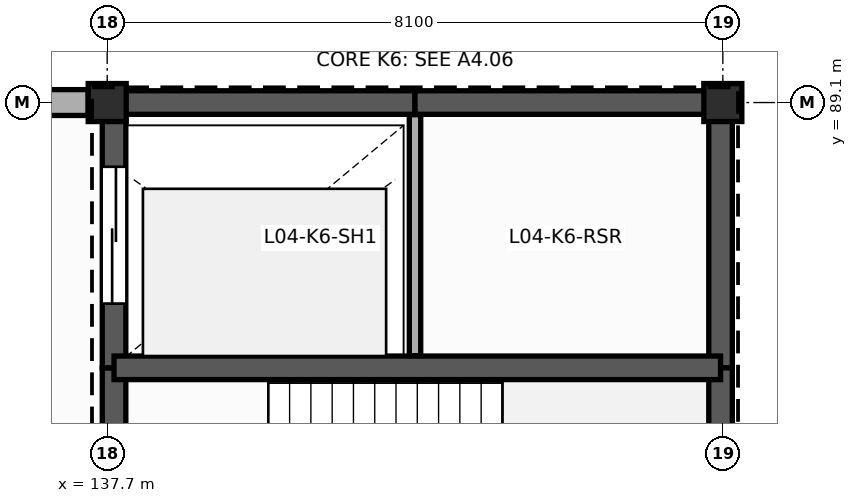
"""IFC4 building model, lengths in metres.
Left out: names, types, materials, properties, quantities, classifications, styles, units other than length and angle.
Written with IfcOpenShell. Run it as: python <this file> out.ifc"""

import sys

from ifc_helpers import new_model, si_unit, direction, frame, frame_2d, origin, origin_2d, place, context, subcontext, project, spatial, rectangle, extrude, element, fill, save


model = new_model("IFC4")
c1 = context("Model", 3, precision=1e-05, world=origin(), true_north=direction((0.0, 1.0)))
c2 = subcontext(c1, "Body", "Model", "MODEL_VIEW")
j1 = project(units=[si_unit("LENGTHUNIT", "METRE"), si_unit("PLANEANGLEUNIT", "RADIAN")], contexts=[c1])
p1 = place(None, origin())
s1 = spatial("IfcSite", under=j1, at=p1, CompositionType="ELEMENT")
p2 = place(p1, origin())
s2 = spatial("IfcBuilding", under=s1, at=p2, CompositionType="ELEMENT")
p3 = place(p2, frame((0.0, 0.0, 19.2)))
s3 = spatial("IfcBuildingStorey", under=s2, at=p3, CompositionType="ELEMENT", Elevation=19.2)
for number, where, z_axis, x_axis in (
    (1, (137.7, 89.1, 0.0), (0.0, 0.0, 1.0), (1.0, 0.0, 0.0)),
    (2, (145.8, 89.1, 0.0), (0.0, 0.0, 1.0), (1.0, 0.0, 0.0)),
):
    element("IfcColumn", number, at=place(p3, frame(where, z_axis=z_axis, x_axis=x_axis)), inside=s3, PredefinedType="COLUMN", context=c2, shape_type="SweptSolid", body=[
        extrude(rectangle(XDim=0.5, YDim=0.5, at=origin_2d()), origin(), (0.0, 0.0, 1.0), 4.2),
    ])
p4 = place(p3, frame((137.45, 89.1, 0.0), z_axis=(0.0, 0.0, 1.0), x_axis=(-1.0, 0.0, 0.0)))
e3 = element("IfcWall", 3, at=p4, inside=s3, PredefinedType="SOLIDWALL", context=c2, shape_type="SweptSolid", body=[
    extrude(rectangle(XDim=7.6, YDim=0.34, at=frame_2d((3.8, 0.0))), origin(), (0.0, 0.0, 1.0), 3.537),
])
p5 = place(p3, frame((137.79, 81.25, 0.0), z_axis=(0.0, 0.0, 1.0), x_axis=(0.0, 1.0, 0.0)))
e4 = element("IfcWall", 4, at=p5, inside=s3, PredefinedType="SHEAR", context=c2, shape_type="SweptSolid", body=[
    extrude(rectangle(XDim=4.36, YDim=0.31, at=frame_2d((2.18, 0.0))), origin(), (0.0, 0.0, 1.0), 4.2),
])
p6 = place(p5, frame((1.35, 0.0, 0.0)))
e5 = element("IfcOpeningElement", 5, at=p6, cuts=e4, PredefinedType="OPENING", context=c2, shape_type="SweptSolid", body=[
    extrude(rectangle(XDim=1.2, YDim=2.25, at=frame_2d((0.6, 1.125))), frame((0.0, 0.165, 0.0), z_axis=(0.0, -1.0, 0.0), x_axis=(1.0, 0.0, 0.0)), (0.0, 0.0, 1.0), 0.33),
])
p7 = place(p3, frame((137.79, 85.61, 0.0), z_axis=(0.0, 0.0, 1.0), x_axis=(0.0, 1.0, 0.0)))
e6 = element("IfcWall", 6, at=p7, inside=s3, PredefinedType="SHEAR", context=c2, shape_type="SweptSolid", body=[
    extrude(rectangle(XDim=3.49, YDim=0.31, at=frame_2d((1.745, 0.0))), origin(), (0.0, 0.0, 1.0), 4.2),
])
p8 = place(p7, frame((0.845, 0.0, 0.0)))
e7 = element("IfcOpeningElement", 7, at=p8, cuts=e6, PredefinedType="OPENING", context=c2, shape_type="SweptSolid", body=[
    extrude(rectangle(XDim=1.8, YDim=2.4, at=frame_2d((0.9, 1.2))), frame((0.0, 0.165, 0.0), z_axis=(0.0, -1.0, 0.0), x_axis=(1.0, 0.0, 0.0)), (0.0, 0.0, 1.0), 0.33),
])
p9 = place(p3, frame((137.79, 89.1, 0.0), z_axis=(0.0, 0.0, 1.0), x_axis=(1.0, 0.0, 0.0)))
e8 = element("IfcWall", 8, at=p9, inside=s3, PredefinedType="SHEAR", context=c2, shape_type="SweptSolid", body=[
    extrude(rectangle(XDim=3.96, YDim=0.31, at=frame_2d((1.98, 0.0))), origin(), (0.0, 0.0, 1.0), 4.2),
])
p10 = place(p3, frame((141.75, 89.1, 0.0), z_axis=(0.0, 0.0, 1.0), x_axis=(1.0, 0.0, 0.0)))
e9 = element("IfcWall", 9, at=p10, inside=s3, PredefinedType="SHEAR", context=c2, shape_type="SweptSolid", body=[
    extrude(rectangle(XDim=4.02, YDim=0.31, at=frame_2d((2.01, 0.0))), origin(), (0.0, 0.0, 1.0), 4.2),
])
p11 = place(p3, frame((145.77, 89.1, 0.0), z_axis=(0.0, 0.0, 1.0), x_axis=(0.0, -1.0, 0.0)))
e10 = element("IfcWall", 10, at=p11, inside=s3, PredefinedType="SHEAR", context=c2, shape_type="SweptSolid", body=[
    extrude(rectangle(XDim=3.49, YDim=0.31, at=frame_2d((1.745, 0.0))), origin(), (0.0, 0.0, 1.0), 4.2),
])
p12 = place(p3, frame((145.77, 85.61, 0.0), z_axis=(0.0, 0.0, 1.0), x_axis=(0.0, -1.0, 0.0)))
e11 = element("IfcWall", 11, at=p12, inside=s3, PredefinedType="SHEAR", context=c2, shape_type="SweptSolid", body=[
    extrude(rectangle(XDim=4.36, YDim=0.31, at=frame_2d((2.18, 0.0))), origin(), (0.0, 0.0, 1.0), 4.2),
])
p13 = place(p3, frame((137.79, 85.61, 0.0), z_axis=(0.0, 0.0, 1.0), x_axis=(1.0, 0.0, 0.0)))
e12 = element("IfcWall", 12, at=p13, inside=s3, PredefinedType="SHEAR", context=c2, shape_type="SweptSolid", body=[
    extrude(rectangle(XDim=7.98, YDim=0.31, at=frame_2d((3.99, 0.0))), origin(), (0.0, 0.0, 1.0), 4.2),
])
p14 = place(p3, frame((141.75, 85.77, 0.0), z_axis=(0.0, 0.0, 1.0), x_axis=(0.0, 1.0, 0.0)))
e13 = element("IfcWall", 13, at=p14, inside=s3, PredefinedType="PLUMBINGWALL", context=c2, shape_type="SweptSolid", body=[
    extrude(rectangle(XDim=3.17, YDim=0.15, at=frame_2d((1.585, 0.0))), origin(), (0.0, 0.0, 1.0), 3.85),
])
p15 = place(p8, origin())
e14 = element("IfcDoor", 14, at=p15, inside=s3, OperationType="SLIDING_TO_LEFT", PredefinedType="DOOR", context=c2, shape_type="SweptSolid", body=[
    extrude(rectangle(XDim=1.8, YDim=2.4, at=frame_2d((0.9, 1.2))), frame((0.0, 0.025, 0.0), z_axis=(0.0, -1.0, 0.0), x_axis=(1.0, 0.0, 0.0)), (0.0, 0.0, 1.0), 0.05),
])
fill(e7, e14)
save(model, sys.argv[1])
